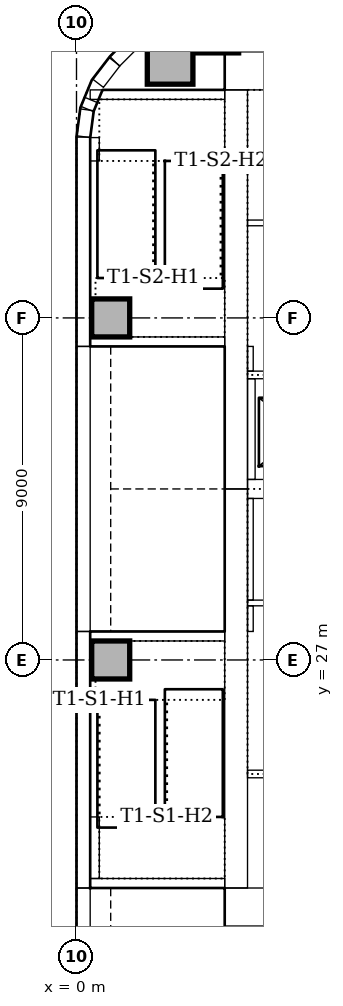
"""IFC4 building model, lengths in metres.
Left out: names, types, materials, properties, quantities, classifications, styles, units other than length and angle.
Written with IfcOpenShell. Run it as: python <this file> out.ifc"""

import sys

from ifc_helpers import new_model, si_unit, direction, frame, frame_2d, origin, origin_2d, place, context, subcontext, project, spatial, rectangle, extrude, element, fill, save


model = new_model("IFC4")
c1 = context("Model", 3, precision=1e-05, world=origin(), true_north=direction((0.0, 1.0)))
c2 = subcontext(c1, "Body", "Model", "MODEL_VIEW")
j1 = project(units=[si_unit("LENGTHUNIT", "METRE"), si_unit("PLANEANGLEUNIT", "RADIAN")], contexts=[c1])
p1 = place(None, origin())
s1 = spatial("IfcSite", under=j1, at=p1, CompositionType="ELEMENT")
p2 = place(p1, origin())
s2 = spatial("IfcBuilding", under=s1, at=p2, CompositionType="ELEMENT")
p3 = place(p2, frame((0.0, 0.0, 26.0)))
s3 = spatial("IfcBuildingStorey", under=s2, at=p3, CompositionType="ELEMENT", Elevation=26.0)
for number, where, z_axis, x_axis in (
    (1, (3.9, 20.5, 0.0), (0.0, 0.0, 1.0), (1.0, 0.0, 0.0)),
    (2, (23.5, 42.5, 0.0), (0.0, 0.0, 1.0), (-1.0, 0.0, 0.0)),
):
    element("IfcWall", number, at=place(p3, frame(where, z_axis=z_axis, x_axis=x_axis)), inside=s3, PredefinedType="SOLIDWALL", context=c2, shape_type="SweptSolid", body=[
        extrude(rectangle(XDim=19.6, YDim=1.0, at=frame_2d((9.8, 0.0))), origin(), (0.0, 0.0, 1.0), 4.0),
    ])
p4 = place(p3, frame((4.2, 42.0, 0.0), z_axis=(0.0, 0.0, 1.0), x_axis=(0.0, -1.0, 0.0)))
e3 = element("IfcWall", 3, at=p4, inside=s3, PredefinedType="SOLIDWALL", context=c2, shape_type="SweptSolid", body=[
    extrude(rectangle(XDim=10.5, YDim=0.6, at=frame_2d((5.25, 0.0))), origin(), (0.0, 0.0, 1.0), 4.0),
])
p5 = place(p4, frame((5.3, 0.0, 0.0)))
e4 = element("IfcOpeningElement", 4, at=p5, cuts=e3, PredefinedType="OPENING", context=c2, shape_type="SweptSolid", body=[
    extrude(rectangle(XDim=1.0, YDim=2.1, at=frame_2d((0.5, 1.05))), frame((0.0, 0.31, 0.0), z_axis=(0.0, -1.0, 0.0), x_axis=(1.0, 0.0, 0.0)), (0.0, 0.0, 1.0), 0.62),
])
p6 = place(p3, frame((4.2, 31.5, 0.0), z_axis=(0.0, 0.0, 1.0), x_axis=(0.0, -1.0, 0.0)))
e5 = element("IfcWall", 5, at=p6, inside=s3, PredefinedType="SOLIDWALL", context=c2, shape_type="SweptSolid", body=[
    extrude(rectangle(XDim=10.5, YDim=0.6, at=frame_2d((5.25, 0.0))), origin(), (0.0, 0.0, 1.0), 4.0),
])
p7 = place(p6, frame((4.25, 0.0, 0.0)))
e6 = element("IfcOpeningElement", 6, at=p7, cuts=e5, PredefinedType="OPENING", context=c2, shape_type="SweptSolid", body=[
    extrude(rectangle(XDim=1.0, YDim=2.1, at=frame_2d((0.5, 1.05))), frame((0.0, 0.31, 0.0), z_axis=(0.0, -1.0, 0.0), x_axis=(1.0, 0.0, 0.0)), (0.0, 0.0, 1.0), 0.62),
])
p8 = place(p3, frame((4.5, 31.5, 0.0), z_axis=(0.0, 0.0, 1.0), x_axis=(1.0, 0.0, 0.0)))
e7 = element("IfcWall", 7, at=p8, inside=s3, PredefinedType="SOLIDWALL", context=c2, shape_type="SweptSolid", body=[
    extrude(rectangle(XDim=18.0, YDim=0.5, at=frame_2d((9.0, 0.0))), origin(), (0.0, 0.0, 1.0), 4.0),
])
p9 = place(p3, frame((0.36, 21.125, 0.0), z_axis=(0.0, 0.0, 1.0), x_axis=(1.0, 0.0, 0.0)))
e8 = element("IfcWall", 8, at=p9, inside=s3, PredefinedType="SOLIDWALL", context=c2, shape_type="SweptSolid", body=[
    extrude(rectangle(XDim=3.54, YDim=0.25, at=frame_2d((1.77, 0.0))), origin(), (0.0, 0.0, 1.0), 4.0),
])
p10 = place(p3, frame((3.9, 27.625, 0.0), z_axis=(0.0, 0.0, 1.0), x_axis=(-1.0, 0.0, 0.0)))
e9 = element("IfcWall", 9, at=p10, inside=s3, PredefinedType="SOLIDWALL", context=c2, shape_type="SweptSolid", body=[
    extrude(rectangle(XDim=3.54, YDim=0.25, at=frame_2d((1.77, 0.0))), origin(), (0.0, 0.0, 1.0), 4.0),
])
p11 = place(p10, frame((0.4, 0.0, 0.0)))
e10 = element("IfcOpeningElement", 10, at=p11, cuts=e9, PredefinedType="OPENING", context=c2, shape_type="SweptSolid", body=[
    extrude(rectangle(XDim=1.0, YDim=2.1, at=frame_2d((0.5, 1.05))), frame((0.0, 0.135, 0.0), z_axis=(0.0, -1.0, 0.0), x_axis=(1.0, 0.0, 0.0)), (0.0, 0.0, 1.0), 0.27),
])
p12 = place(p3, frame((0.36, 35.375, 0.0), z_axis=(0.0, 0.0, 1.0), x_axis=(1.0, 0.0, 0.0)))
e11 = element("IfcWall", 11, at=p12, inside=s3, PredefinedType="SOLIDWALL", context=c2, shape_type="SweptSolid", body=[
    extrude(rectangle(XDim=3.54, YDim=0.25, at=frame_2d((1.77, 0.0))), origin(), (0.0, 0.0, 1.0), 4.0),
])
p13 = place(p12, frame((2.14, 0.0, 0.0)))
e12 = element("IfcOpeningElement", 12, at=p13, cuts=e11, PredefinedType="OPENING", context=c2, shape_type="SweptSolid", body=[
    extrude(rectangle(XDim=1.0, YDim=2.1, at=frame_2d((0.5, 1.05))), frame((0.0, 0.135, 0.0), z_axis=(0.0, -1.0, 0.0), x_axis=(1.0, 0.0, 0.0)), (0.0, 0.0, 1.0), 0.27),
])
p14 = place(p3, frame((3.9, 41.875, 0.0), z_axis=(0.0, 0.0, 1.0), x_axis=(-1.0, 0.0, 0.0)))
e13 = element("IfcWall", 13, at=p14, inside=s3, PredefinedType="SOLIDWALL", context=c2, shape_type="SweptSolid", body=[
    extrude(rectangle(XDim=3.54, YDim=0.25, at=frame_2d((1.77, 0.0))), origin(), (0.0, 0.0, 1.0), 4.0),
])
for number, where, z_axis, x_axis in (
    (14, (3.667, 43.574, 0.0), (0.0, 0.0, 1.0), (1.0, 0.0, 0.0)),
    (15, (2.463, 42.75, 0.0), (0.0, 0.0, 1.0), (1.0, 0.0, 0.0)),
):
    element("IfcColumn", number, at=place(p3, frame(where, z_axis=z_axis, x_axis=x_axis)), inside=s3, PredefinedType="COLUMN", context=c2, shape_type="SweptSolid", body=[
        extrude(rectangle(XDim=1.2, YDim=1.2, at=origin_2d()), origin(), (0.0, 0.0, 1.0), 3.85),
    ])
for number, where, z_axis, x_axis in (
    (16, (0.9, 27.0, 0.0), (0.0, 0.0, 1.0), (1.0, 0.0, 0.0)),
    (17, (0.9, 36.0, 0.0), (0.0, 0.0, 1.0), (1.0, 0.0, 0.0)),
):
    element("IfcColumn", number, at=place(p3, frame(where, z_axis=z_axis, x_axis=x_axis)), inside=s3, PredefinedType="COLUMN", context=c2, shape_type="SweptSolid", body=[
        extrude(rectangle(XDim=1.0, YDim=1.0, at=origin_2d()), origin(), (0.0, 0.0, 1.0), 4.0),
    ])
p15 = place(p3, frame((2.249, 43.994, 0.0), z_axis=(0.0, 0.0, 1.0), x_axis=(-0.707106781187, -0.707106781187, 0.0)))
e18 = element("IfcWall", 18, at=p15, inside=s3, PredefinedType="STANDARD", context=c2, shape_type="SweptSolid", body=[
    extrude(rectangle(XDim=1.757, YDim=0.36, at=frame_2d((0.879, 0.0))), origin(), (0.0, 0.0, 1.0), 3.85),
])
p16 = place(p3, frame((0.18, 40.757, 0.0), z_axis=(0.0, 0.0, 1.0), x_axis=(0.0, -1.0, 0.0)))
e19 = element("IfcWall", 19, at=p16, inside=s3, PredefinedType="STANDARD", context=c2, shape_type="SweptSolid", body=[
    extrude(rectangle(XDim=5.507, YDim=0.36, at=frame_2d((2.754, 0.0))), origin(), (0.0, 0.0, 1.0), 3.85),
])
p17 = place(p3, frame((0.18, 35.25, 0.0), z_axis=(0.0, 0.0, 1.0), x_axis=(0.0, -1.0, 0.0)))
e20 = element("IfcWall", 20, at=p17, inside=s3, PredefinedType="STANDARD", context=c2, shape_type="SweptSolid", body=[
    extrude(rectangle(XDim=7.5, YDim=0.36, at=frame_2d((3.75, 0.0))), origin(), (0.0, 0.0, 1.0), 3.85),
])
p18 = place(p3, frame((0.18, 27.75, 0.0), z_axis=(0.0, 0.0, 1.0), x_axis=(0.0, -1.0, 0.0)))
e21 = element("IfcWall", 21, at=p18, inside=s3, PredefinedType="STANDARD", context=c2, shape_type="SweptSolid", body=[
    extrude(rectangle(XDim=6.75, YDim=0.36, at=frame_2d((3.375, 0.0))), origin(), (0.0, 0.0, 1.0), 3.85),
])
p19 = place(p3, frame((0.18, 21.0, 0.0), z_axis=(0.0, 0.0, 1.0), x_axis=(0.0, -1.0, 0.0)))
e22 = element("IfcWall", 22, at=p19, inside=s3, PredefinedType="STANDARD", context=c2, shape_type="SweptSolid", body=[
    extrude(rectangle(XDim=16.757, YDim=0.36, at=frame_2d((8.379, 0.0))), origin(), (0.0, 0.0, 1.0), 3.85),
])
p20 = place(p19, frame((1.35, 0.0, 0.9)))
e23 = element("IfcOpeningElement", 23, at=p20, cuts=e22, PredefinedType="OPENING", context=c2, shape_type="SweptSolid", body=[
    extrude(rectangle(XDim=3.3, YDim=1.6, at=frame_2d((1.65, 0.8))), frame((0.0, 0.19, 0.0), z_axis=(0.0, -1.0, 0.0), x_axis=(1.0, 0.0, 0.0)), (0.0, 0.0, 1.0), 0.38),
])
p21 = place(p19, frame((6.15, 0.0, 0.9)))
e24 = element("IfcOpeningElement", 24, at=p21, cuts=e22, PredefinedType="OPENING", context=c2, shape_type="SweptSolid", body=[
    extrude(rectangle(XDim=3.3, YDim=1.6, at=frame_2d((1.65, 0.8))), frame((0.0, 0.19, 0.0), z_axis=(0.0, -1.0, 0.0), x_axis=(1.0, 0.0, 0.0)), (0.0, 0.0, 1.0), 0.38),
])
p22 = place(p19, frame((10.35, 0.0, 0.9)))
e25 = element("IfcOpeningElement", 25, at=p22, cuts=e22, PredefinedType="OPENING", context=c2, shape_type="SweptSolid", body=[
    extrude(rectangle(XDim=3.3, YDim=1.6, at=frame_2d((1.65, 0.8))), frame((0.0, 0.19, 0.0), z_axis=(0.0, -1.0, 0.0), x_axis=(1.0, 0.0, 0.0)), (0.0, 0.0, 1.0), 0.38),
])
p23 = place(p3, frame((1.0, 42.741, 0.0), z_axis=(0.0, 0.0, 1.0), x_axis=(-0.608802368033, -0.793321924995, 0.0)))
e26 = element("IfcWall", 26, at=p23, inside=s3, PredefinedType="STANDARD", context=c2, shape_type="SweptSolid", body=[
    extrude(rectangle(XDim=0.713, YDim=0.36, at=frame_2d((0.357, 0.0))), origin(), (0.0, 0.0, 1.0), 3.85),
])
p24 = place(p3, frame((0.381, 41.736, 0.0), z_axis=(0.0, 0.0, 1.0), x_axis=(-0.382773360986, -0.923842277729, 0.0)))
e27 = element("IfcWall", 27, at=p24, inside=s3, PredefinedType="STANDARD", context=c2, shape_type="SweptSolid", body=[
    extrude(rectangle(XDim=0.258, YDim=0.36, at=frame_2d((0.129, 0.0))), origin(), (0.0, 0.0, 1.0), 3.85),
])
p25 = place(p3, frame((0.276, 41.476, 0.0), z_axis=(0.0, 0.0, 1.0), x_axis=(-0.13055608231, -0.99144092581, 0.0)))
e28 = element("IfcWall", 28, at=p25, inside=s3, PredefinedType="STANDARD", context=c2, shape_type="SweptSolid", body=[
    extrude(rectangle(XDim=0.713, YDim=0.36, at=frame_2d((0.356, 0.0))), origin(), (0.0, 0.0, 1.0), 3.85),
])
p26 = place(p3, frame((0.48, 21.25, 0.0), z_axis=(0.0, 0.0, 1.0), x_axis=(0.0, 1.0, 0.0)))
e29 = element("IfcWall", 29, at=p26, inside=s3, PredefinedType="STANDARD", context=c2, shape_type="SweptSolid", body=[
    extrude(rectangle(XDim=1.62, YDim=0.24, at=frame_2d((0.81, 0.0))), origin(), (0.0, 0.0, 1.0), 4.0),
])
p27 = place(p3, frame((0.48, 40.13, 0.0), z_axis=(0.0, 0.0, 1.0), x_axis=(0.0, 1.0, 0.0)))
e30 = element("IfcWall", 30, at=p27, inside=s3, PredefinedType="STANDARD", context=c2, shape_type="SweptSolid", body=[
    extrude(rectangle(XDim=0.615, YDim=0.24, at=frame_2d((0.307, 0.0))), origin(), (0.0, 0.0, 1.0), 4.0),
])
p28 = place(p3, frame((4.5, 24.0, 0.0), z_axis=(0.0, 0.0, 1.0), x_axis=(1.0, 0.0, 0.0)))
e31 = element("IfcWall", 31, at=p28, inside=s3, PredefinedType="PARTITIONING", context=c2, shape_type="SweptSolid", body=[
    extrude(rectangle(XDim=18.0, YDim=0.2, at=frame_2d((9.0, 0.0))), origin(), (0.0, 0.0, 1.0), 3.85),
])
p29 = place(p28, frame((0.95, 0.0, 0.0)))
e32 = element("IfcOpeningElement", 32, at=p29, cuts=e31, PredefinedType="OPENING", context=c2, shape_type="SweptSolid", body=[
    extrude(rectangle(XDim=1.1, YDim=2.1, at=frame_2d((0.55, 1.05))), frame((0.0, 0.11, 0.0), z_axis=(0.0, -1.0, 0.0), x_axis=(1.0, 0.0, 0.0)), (0.0, 0.0, 1.0), 0.22),
])
p30 = place(p28, frame((3.95, 0.0, 0.0)))
e33 = element("IfcOpeningElement", 33, at=p30, cuts=e31, PredefinedType="OPENING", context=c2, shape_type="SweptSolid", body=[
    extrude(rectangle(XDim=1.1, YDim=2.1, at=frame_2d((0.55, 1.05))), frame((0.0, 0.11, 0.0), z_axis=(0.0, -1.0, 0.0), x_axis=(1.0, 0.0, 0.0)), (0.0, 0.0, 1.0), 0.22),
])
p31 = place(p28, frame((6.95, 0.0, 0.0)))
e34 = element("IfcOpeningElement", 34, at=p31, cuts=e31, PredefinedType="OPENING", context=c2, shape_type="SweptSolid", body=[
    extrude(rectangle(XDim=1.1, YDim=2.1, at=frame_2d((0.55, 1.05))), frame((0.0, 0.11, 0.0), z_axis=(0.0, -1.0, 0.0), x_axis=(1.0, 0.0, 0.0)), (0.0, 0.0, 1.0), 0.22),
])
p32 = place(p28, frame((9.95, 0.0, 0.0)))
e35 = element("IfcOpeningElement", 35, at=p32, cuts=e31, PredefinedType="OPENING", context=c2, shape_type="SweptSolid", body=[
    extrude(rectangle(XDim=1.1, YDim=2.1, at=frame_2d((0.55, 1.05))), frame((0.0, 0.11, 0.0), z_axis=(0.0, -1.0, 0.0), x_axis=(1.0, 0.0, 0.0)), (0.0, 0.0, 1.0), 0.22),
])
p33 = place(p28, frame((12.95, 0.0, 0.0)))
e36 = element("IfcOpeningElement", 36, at=p33, cuts=e31, PredefinedType="OPENING", context=c2, shape_type="SweptSolid", body=[
    extrude(rectangle(XDim=1.1, YDim=2.1, at=frame_2d((0.55, 1.05))), frame((0.0, 0.11, 0.0), z_axis=(0.0, -1.0, 0.0), x_axis=(1.0, 0.0, 0.0)), (0.0, 0.0, 1.0), 0.22),
])
p34 = place(p28, frame((15.95, 0.0, 0.0)))
e37 = element("IfcOpeningElement", 37, at=p34, cuts=e31, PredefinedType="OPENING", context=c2, shape_type="SweptSolid", body=[
    extrude(rectangle(XDim=1.1, YDim=2.1, at=frame_2d((0.55, 1.05))), frame((0.0, 0.11, 0.0), z_axis=(0.0, -1.0, 0.0), x_axis=(1.0, 0.0, 0.0)), (0.0, 0.0, 1.0), 0.22),
])
p35 = place(p3, frame((4.5, 34.5, 0.0), z_axis=(0.0, 0.0, 1.0), x_axis=(1.0, 0.0, 0.0)))
e38 = element("IfcWall", 38, at=p35, inside=s3, PredefinedType="PARTITIONING", context=c2, shape_type="SweptSolid", body=[
    extrude(rectangle(XDim=18.0, YDim=0.2, at=frame_2d((9.0, 0.0))), origin(), (0.0, 0.0, 1.0), 3.85),
])
p36 = place(p35, frame((0.95, 0.0, 0.0)))
e39 = element("IfcOpeningElement", 39, at=p36, cuts=e38, PredefinedType="OPENING", context=c2, shape_type="SweptSolid", body=[
    extrude(rectangle(XDim=1.1, YDim=2.1, at=frame_2d((0.55, 1.05))), frame((0.0, 0.11, 0.0), z_axis=(0.0, -1.0, 0.0), x_axis=(1.0, 0.0, 0.0)), (0.0, 0.0, 1.0), 0.22),
])
p37 = place(p35, frame((3.95, 0.0, 0.0)))
e40 = element("IfcOpeningElement", 40, at=p37, cuts=e38, PredefinedType="OPENING", context=c2, shape_type="SweptSolid", body=[
    extrude(rectangle(XDim=1.1, YDim=2.1, at=frame_2d((0.55, 1.05))), frame((0.0, 0.11, 0.0), z_axis=(0.0, -1.0, 0.0), x_axis=(1.0, 0.0, 0.0)), (0.0, 0.0, 1.0), 0.22),
])
p38 = place(p35, frame((12.95, 0.0, 0.0)))
e41 = element("IfcOpeningElement", 41, at=p38, cuts=e38, PredefinedType="OPENING", context=c2, shape_type="SweptSolid", body=[
    extrude(rectangle(XDim=1.1, YDim=2.1, at=frame_2d((0.55, 1.05))), frame((0.0, 0.11, 0.0), z_axis=(0.0, -1.0, 0.0), x_axis=(1.0, 0.0, 0.0)), (0.0, 0.0, 1.0), 0.22),
])
p39 = place(p35, frame((15.95, 0.0, 0.0)))
e42 = element("IfcOpeningElement", 42, at=p39, cuts=e38, PredefinedType="OPENING", context=c2, shape_type="SweptSolid", body=[
    extrude(rectangle(XDim=1.1, YDim=2.1, at=frame_2d((0.55, 1.05))), frame((0.0, 0.11, 0.0), z_axis=(0.0, -1.0, 0.0), x_axis=(1.0, 0.0, 0.0)), (0.0, 0.0, 1.0), 0.22),
])
p40 = place(p3, frame((4.6, 31.75, 0.0), z_axis=(0.0, 0.0, 1.0), x_axis=(0.0, 1.0, 0.0)))
e43 = element("IfcWall", 43, at=p40, inside=s3, PredefinedType="PARTITIONING", context=c2, shape_type="SweptSolid", body=[
    extrude(rectangle(XDim=2.65, YDim=0.2, at=frame_2d((1.325, 0.0))), origin(), (0.0, 0.0, 1.0), 3.85),
])
p41 = place(p3, frame((4.5, 28.5, 0.0), z_axis=(0.0, 0.0, 1.0), x_axis=(1.0, 0.0, 0.0)))
e44 = element("IfcWall", 44, at=p41, inside=s3, PredefinedType="PARTITIONING", context=c2, shape_type="SweptSolid", body=[
    extrude(rectangle(XDim=18.0, YDim=0.15, at=frame_2d((9.0, 0.0))), origin(), (0.0, 0.0, 1.0), 3.85),
])
p42 = place(p41, frame((3.35, 0.0, 0.0)))
e45 = element("IfcOpeningElement", 45, at=p42, cuts=e44, PredefinedType="OPENING", context=c2, shape_type="SweptSolid", body=[
    extrude(rectangle(XDim=0.9, YDim=2.1, at=frame_2d((0.45, 1.05))), frame((0.0, 0.085, 0.0), z_axis=(0.0, -1.0, 0.0), x_axis=(1.0, 0.0, 0.0)), (0.0, 0.0, 1.0), 0.17),
])
p43 = place(p41, frame((8.55, 0.0, 0.0)))
e46 = element("IfcOpeningElement", 46, at=p43, cuts=e44, PredefinedType="OPENING", context=c2, shape_type="SweptSolid", body=[
    extrude(rectangle(XDim=0.9, YDim=2.1, at=frame_2d((0.45, 1.05))), frame((0.0, 0.085, 0.0), z_axis=(0.0, -1.0, 0.0), x_axis=(1.0, 0.0, 0.0)), (0.0, 0.0, 1.0), 0.17),
])
p44 = place(p41, frame((13.7, 0.0, 0.0)))
e47 = element("IfcOpeningElement", 47, at=p44, cuts=e44, PredefinedType="OPENING", context=c2, shape_type="SweptSolid", body=[
    extrude(rectangle(XDim=0.9, YDim=2.1, at=frame_2d((0.45, 1.05))), frame((0.0, 0.085, 0.0), z_axis=(0.0, -1.0, 0.0), x_axis=(1.0, 0.0, 0.0)), (0.0, 0.0, 1.0), 0.17),
])
p45 = place(p3, frame((4.5, 38.5, 0.0), z_axis=(0.0, 0.0, 1.0), x_axis=(1.0, 0.0, 0.0)))
e48 = element("IfcWall", 48, at=p45, inside=s3, PredefinedType="PARTITIONING", context=c2, shape_type="SweptSolid", body=[
    extrude(rectangle(XDim=11.9, YDim=0.15, at=frame_2d((5.95, 0.0))), origin(), (0.0, 0.0, 1.0), 3.85),
])
p46 = place(p45, frame((1.1, 0.0, 0.0)))
e49 = element("IfcOpeningElement", 49, at=p46, cuts=e48, PredefinedType="OPENING", context=c2, shape_type="SweptSolid", body=[
    extrude(rectangle(XDim=0.9, YDim=2.1, at=frame_2d((0.45, 1.05))), frame((0.0, 0.085, 0.0), z_axis=(0.0, -1.0, 0.0), x_axis=(1.0, 0.0, 0.0)), (0.0, 0.0, 1.0), 0.17),
])
p47 = place(p45, frame((3.3, 0.0, 0.0)))
e50 = element("IfcOpeningElement", 50, at=p47, cuts=e48, PredefinedType="OPENING", context=c2, shape_type="SweptSolid", body=[
    extrude(rectangle(XDim=0.9, YDim=2.1, at=frame_2d((0.45, 1.05))), frame((0.0, 0.085, 0.0), z_axis=(0.0, -1.0, 0.0), x_axis=(1.0, 0.0, 0.0)), (0.0, 0.0, 1.0), 0.17),
])
p48 = place(p45, frame((6.3, 0.0, 0.0)))
e51 = element("IfcOpeningElement", 51, at=p48, cuts=e48, PredefinedType="OPENING", context=c2, shape_type="SweptSolid", body=[
    extrude(rectangle(XDim=0.9, YDim=2.1, at=frame_2d((0.45, 1.05))), frame((0.0, 0.085, 0.0), z_axis=(0.0, -1.0, 0.0), x_axis=(1.0, 0.0, 0.0)), (0.0, 0.0, 1.0), 0.17),
])
p49 = place(p45, frame((9.95, 0.0, 0.0)))
e52 = element("IfcOpeningElement", 52, at=p49, cuts=e48, PredefinedType="OPENING", context=c2, shape_type="SweptSolid", body=[
    extrude(rectangle(XDim=0.8, YDim=2.1, at=frame_2d((0.4, 1.05))), frame((0.0, 0.085, 0.0), z_axis=(0.0, -1.0, 0.0), x_axis=(1.0, 0.0, 0.0)), (0.0, 0.0, 1.0), 0.17),
])
p50 = place(p3, frame((4.575, 27.75, 0.0), z_axis=(0.0, 0.0, 1.0), x_axis=(0.0, 1.0, 0.0)))
e53 = element("IfcWall", 53, at=p50, inside=s3, PredefinedType="PARTITIONING", context=c2, shape_type="SweptSolid", body=[
    extrude(rectangle(XDim=0.675, YDim=0.15, at=frame_2d((0.338, 0.0))), origin(), (0.0, 0.0, 1.0), 3.85),
])
p51 = place(p3, frame((4.575, 28.575, 0.0), z_axis=(0.0, 0.0, 1.0), x_axis=(0.0, 1.0, 0.0)))
e54 = element("IfcWall", 54, at=p51, inside=s3, PredefinedType="PARTITIONING", context=c2, shape_type="SweptSolid", body=[
    extrude(rectangle(XDim=2.675, YDim=0.15, at=frame_2d((1.337, 0.0))), origin(), (0.0, 0.0, 1.0), 3.85),
])
p52 = place(p3, frame((4.575, 34.6, 0.0), z_axis=(0.0, 0.0, 1.0), x_axis=(0.0, 1.0, 0.0)))
e55 = element("IfcWall", 55, at=p52, inside=s3, PredefinedType="PARTITIONING", context=c2, shape_type="SweptSolid", body=[
    extrude(rectangle(XDim=0.65, YDim=0.15, at=frame_2d((0.325, 0.0))), origin(), (0.0, 0.0, 1.0), 3.85),
])
p53 = place(p7, frame((1.0, 0.0, 0.0), z_axis=(0.0, 0.0, 1.0), x_axis=(-1.0, 0.0, 0.0)))
e56 = element("IfcDoor", 56, at=p53, inside=s3, OperationType="SINGLE_SWING_RIGHT", PredefinedType="DOOR", context=c2, shape_type="SweptSolid", body=[
    extrude(rectangle(XDim=1.0, YDim=2.1, at=frame_2d((0.5, 1.05))), frame((0.0, 0.025, 0.0), z_axis=(0.0, -1.0, 0.0), x_axis=(1.0, 0.0, 0.0)), (0.0, 0.0, 1.0), 0.05),
])
fill(e6, e56)
p54 = place(p11, origin())
e57 = element("IfcDoor", 57, at=p54, inside=s3, OperationType="SINGLE_SWING_LEFT", PredefinedType="DOOR", context=c2, shape_type="SweptSolid", body=[
    extrude(rectangle(XDim=1.0, YDim=2.1, at=frame_2d((0.5, 1.05))), frame((0.0, 0.025, 0.0), z_axis=(0.0, -1.0, 0.0), x_axis=(1.0, 0.0, 0.0)), (0.0, 0.0, 1.0), 0.05),
])
fill(e10, e57)
p55 = place(p5, frame((1.0, 0.0, 0.0), z_axis=(0.0, 0.0, 1.0), x_axis=(-1.0, 0.0, 0.0)))
e58 = element("IfcDoor", 58, at=p55, inside=s3, OperationType="SINGLE_SWING_LEFT", PredefinedType="DOOR", context=c2, shape_type="SweptSolid", body=[
    extrude(rectangle(XDim=1.0, YDim=2.1, at=frame_2d((0.5, 1.05))), frame((0.0, 0.025, 0.0), z_axis=(0.0, -1.0, 0.0), x_axis=(1.0, 0.0, 0.0)), (0.0, 0.0, 1.0), 0.05),
])
fill(e4, e58)
p56 = place(p13, origin())
e59 = element("IfcDoor", 59, at=p56, inside=s3, OperationType="SINGLE_SWING_RIGHT", PredefinedType="DOOR", context=c2, shape_type="SweptSolid", body=[
    extrude(rectangle(XDim=1.0, YDim=2.1, at=frame_2d((0.5, 1.05))), frame((0.0, 0.025, 0.0), z_axis=(0.0, -1.0, 0.0), x_axis=(1.0, 0.0, 0.0)), (0.0, 0.0, 1.0), 0.05),
])
fill(e12, e59)
save(model, sys.argv[1])
